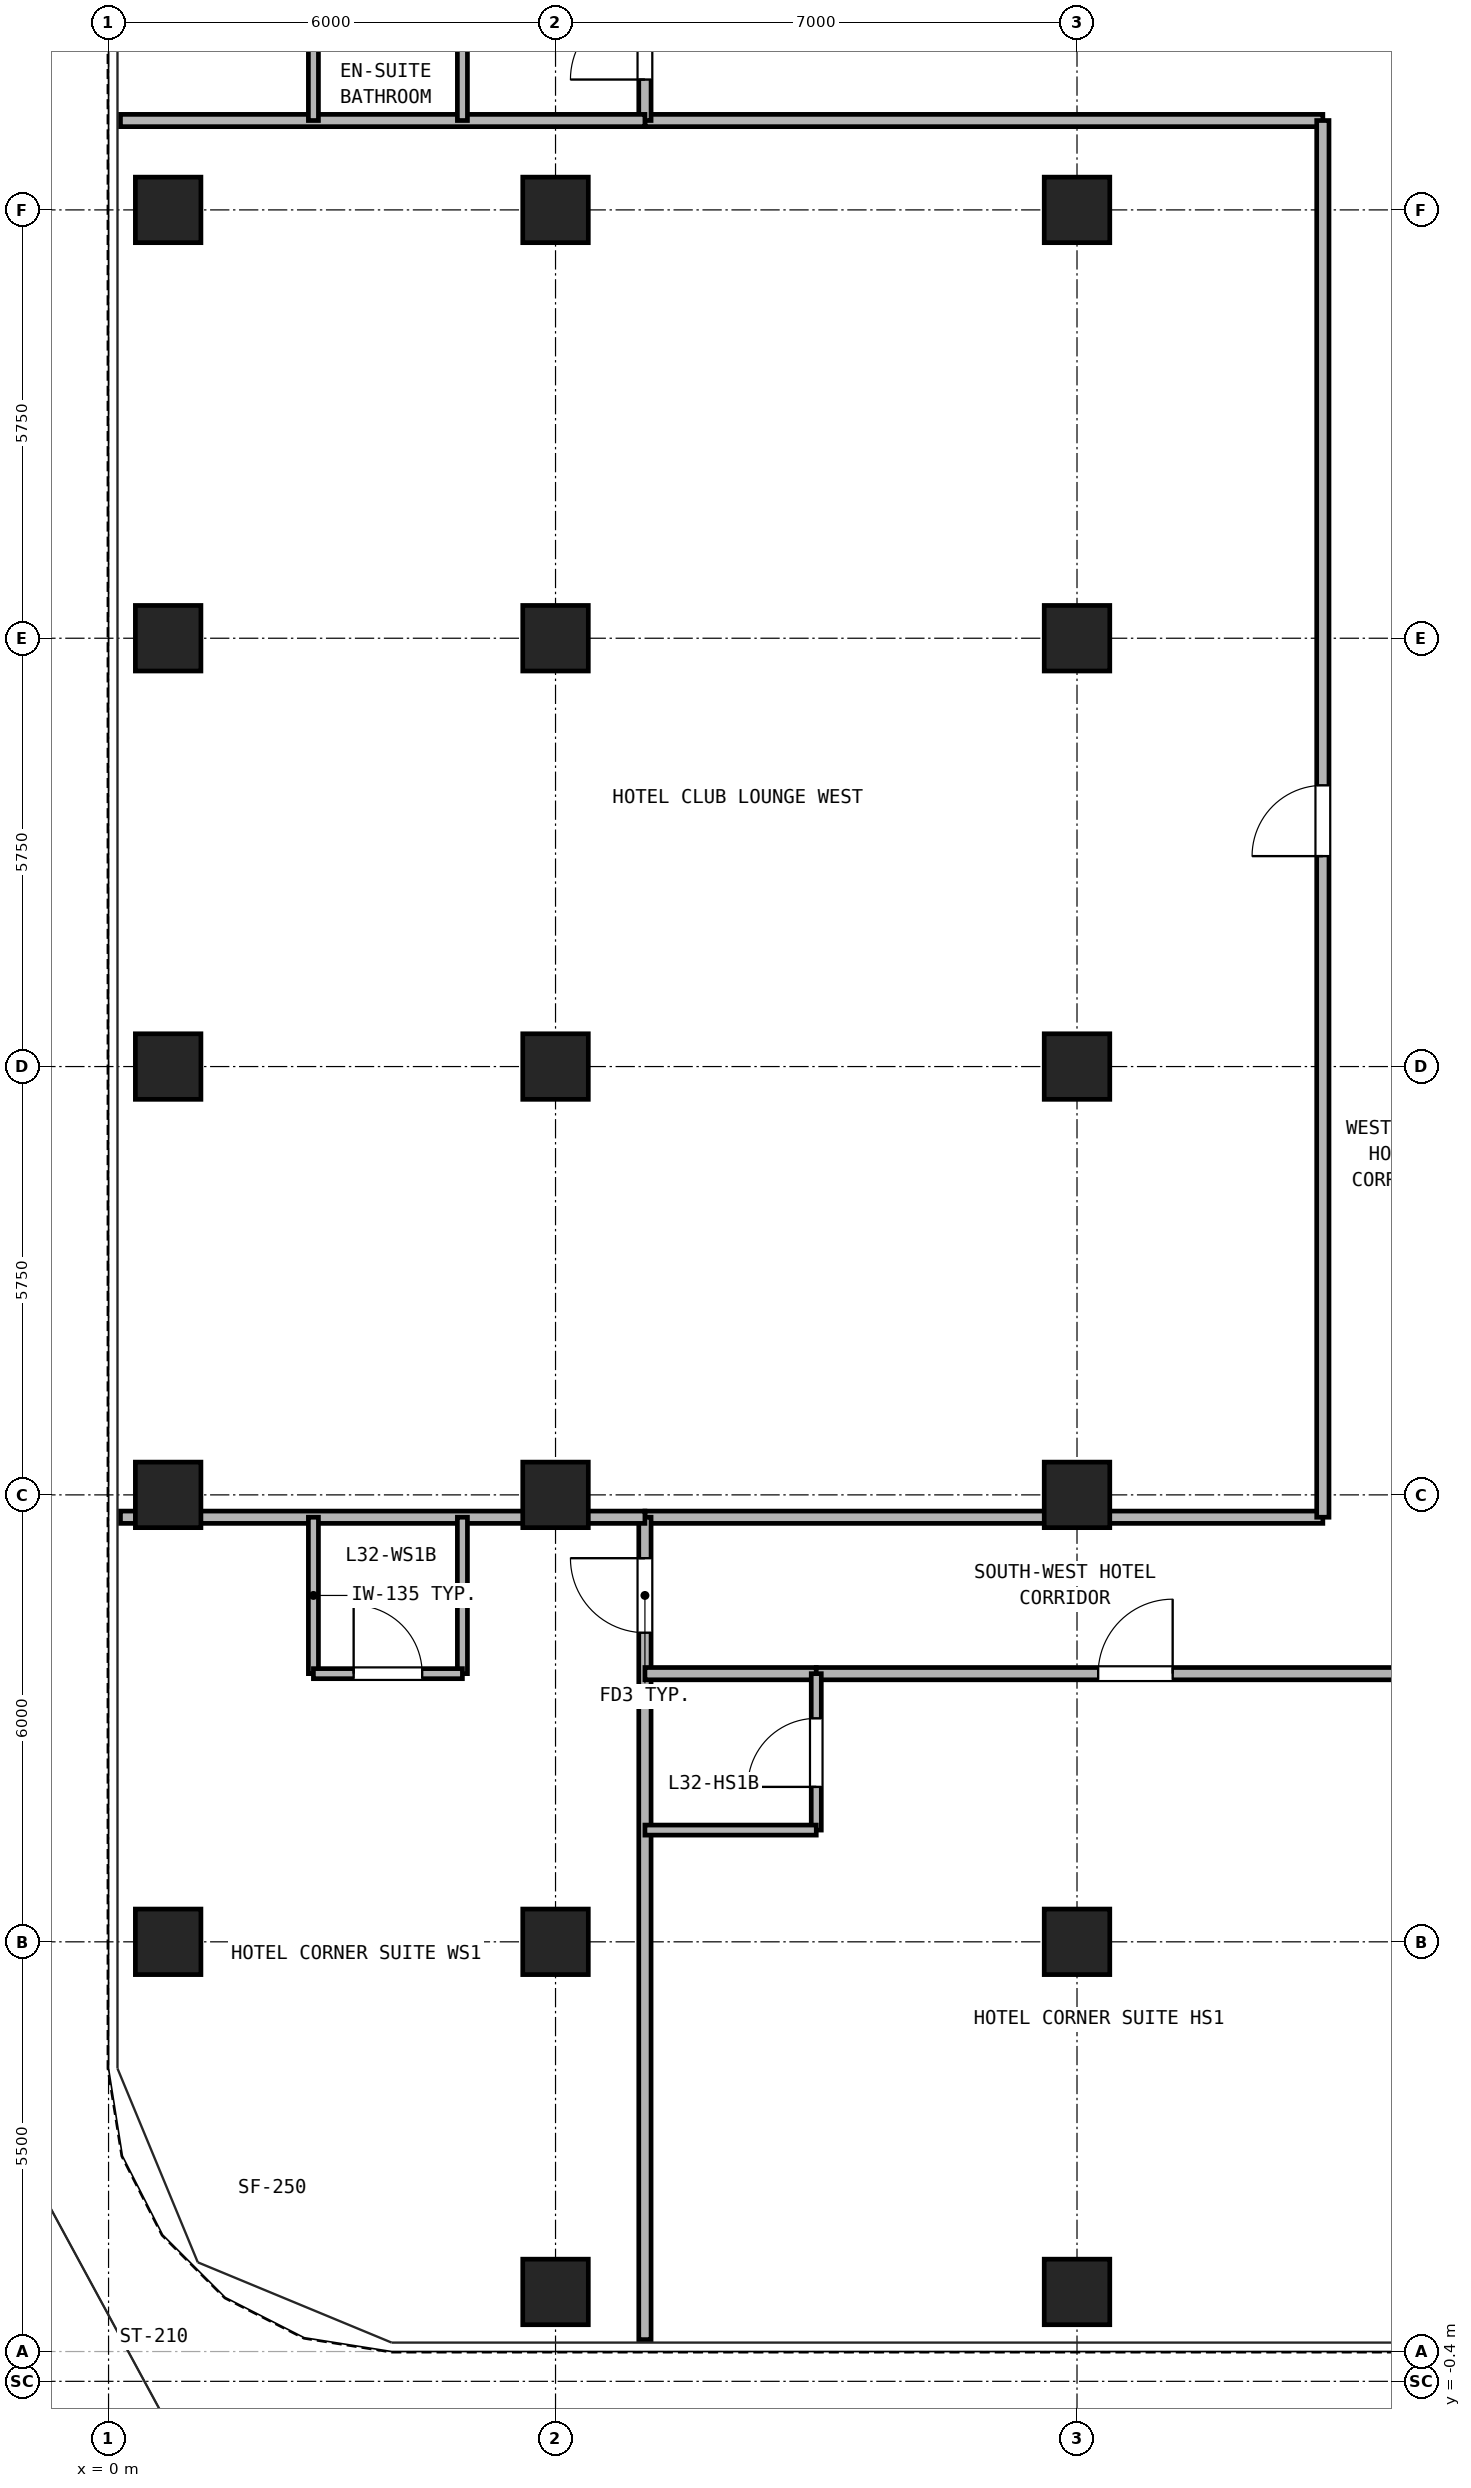
"""IFC4 building model, lengths in metres.
Left out: names, types, materials, properties, quantities, classifications, styles, units other than length and angle.
Written with IfcOpenShell. Run it as: python <this file> out.ifc"""

import sys

from ifc_helpers import new_model, si_unit, direction, frame, frame_2d, origin, origin_2d, place, context, subcontext, project, spatial, rectangle, hollow_rectangle, extrude, source, transform, mapped, element, fill, save


model = new_model("IFC4")
c1 = context("Model", 3, precision=1e-05, world=origin(), true_north=direction((0.0, 1.0)))
c2 = subcontext(c1, "Body", "Model", "MODEL_VIEW")
j1 = project(units=[si_unit("LENGTHUNIT", "METRE"), si_unit("PLANEANGLEUNIT", "RADIAN")], contexts=[c1])
p1 = place(None, origin())
s1 = spatial("IfcSite", under=j1, at=p1, CompositionType="ELEMENT")
p2 = place(p1, origin())
s2 = spatial("IfcBuilding", under=s1, at=p2, CompositionType="ELEMENT")
p3 = place(p2, frame((0.0, 0.0, 118.3)))
s3 = spatial("IfcBuildingStorey", under=s2, at=p3, CompositionType="ELEMENT", Elevation=118.3)
m1 = source(origin(), c2, "Body", "SweptSolid", [
    extrude(hollow_rectangle(XDim=0.88, YDim=0.88, WallThickness=0.05, at=origin_2d()), origin(), (0.0, 0.0, 1.0), 2.95),
])
for number, where, z_axis, x_axis in (
    (1, (6.0, 0.8, 0.0), (0.0, 0.0, 1.0), (1.0, 0.0, 0.0)),
    (2, (13.0, 0.8, 0.0), (0.0, 0.0, 1.0), (1.0, 0.0, 0.0)),
    (3, (0.8, 5.5, 0.0), (0.0, 0.0, 1.0), (1.0, 0.0, 0.0)),
    (4, (0.8, 11.5, 0.0), (0.0, 0.0, 1.0), (1.0, 0.0, 0.0)),
    (5, (0.8, 17.25, 0.0), (0.0, 0.0, 1.0), (1.0, 0.0, 0.0)),
    (6, (0.8, 23.0, 0.0), (0.0, 0.0, 1.0), (1.0, 0.0, 0.0)),
    (7, (0.8, 28.75, 0.0), (0.0, 0.0, 1.0), (1.0, 0.0, 0.0)),
    (8, (6.0, 5.5, 0.0), (0.0, 0.0, 1.0), (1.0, 0.0, 0.0)),
    (9, (6.0, 11.5, 0.0), (0.0, 0.0, 1.0), (1.0, 0.0, 0.0)),
    (10, (6.0, 17.25, 0.0), (0.0, 0.0, 1.0), (1.0, 0.0, 0.0)),
    (11, (6.0, 23.0, 0.0), (0.0, 0.0, 1.0), (1.0, 0.0, 0.0)),
    (12, (6.0, 28.75, 0.0), (0.0, 0.0, 1.0), (1.0, 0.0, 0.0)),
    (13, (13.0, 5.5, 0.0), (0.0, 0.0, 1.0), (1.0, 0.0, 0.0)),
    (14, (13.0, 11.5, 0.0), (0.0, 0.0, 1.0), (1.0, 0.0, 0.0)),
    (15, (13.0, 17.25, 0.0), (0.0, 0.0, 1.0), (1.0, 0.0, 0.0)),
    (16, (13.0, 23.0, 0.0), (0.0, 0.0, 1.0), (1.0, 0.0, 0.0)),
    (17, (13.0, 28.75, 0.0), (0.0, 0.0, 1.0), (1.0, 0.0, 0.0)),
):
    element("IfcColumn", number, at=place(p3, frame(where, z_axis=z_axis, x_axis=x_axis)), inside=s3, PredefinedType="COLUMN", context=c2, shape_type="MappedRepresentation", body=[
        mapped(m1, transform((0.0, 0.0, 0.0), x_axis=(1.0, 0.0, 0.0), y_axis=(0.0, 1.0, 0.0), z_axis=(0.0, 0.0, 1.0), scale=1.0)),
    ])
for number, where, z_axis, x_axis in (
    (18, (7.2, 11.2, 0.0), (0.0, 0.0, 1.0), (1.0, 0.0, 0.0)),
    (19, (7.2, 29.95, 0.0), (0.0, 0.0, 1.0), (1.0, 0.0, 0.0)),
):
    element("IfcWall", number, at=place(p3, frame(where, z_axis=z_axis, x_axis=x_axis)), inside=s3, PredefinedType="PARTITIONING", context=c2, shape_type="SweptSolid", body=[
        extrude(rectangle(XDim=9.1, YDim=0.165, at=frame_2d((4.55, 0.0))), origin(), (0.0, 0.0, 1.0), 2.95),
    ])
p4 = place(p3, frame((16.3, 11.2, 0.0), z_axis=(0.0, 0.0, 1.0), x_axis=(0.0, 1.0, 0.0)))
e20 = element("IfcWall", 20, at=p4, inside=s3, PredefinedType="PARTITIONING", context=c2, shape_type="SweptSolid", body=[
    extrude(rectangle(XDim=18.75, YDim=0.165, at=frame_2d((9.375, 0.0))), origin(), (0.0, 0.0, 1.0), 2.95),
])
p5 = place(p4, frame((8.875, 0.0, 0.0)))
e21 = element("IfcOpeningElement", 21, at=p5, cuts=e20, PredefinedType="OPENING", context=c2, shape_type="SweptSolid", body=[
    extrude(rectangle(XDim=0.95, YDim=2.15, at=frame_2d((0.475, 1.075))), frame((0.0, 0.093, 0.0), z_axis=(0.0, -1.0, 0.0), x_axis=(1.0, 0.0, 0.0)), (0.0, 0.0, 1.0), 0.185),
])
p6 = place(p3, frame((7.2, 0.16, 0.0), z_axis=(0.0, 0.0, 1.0), x_axis=(0.0, 1.0, 0.0)))
e22 = element("IfcWall", 22, at=p6, inside=s3, PredefinedType="PARTITIONING", context=c2, shape_type="SweptSolid", body=[
    extrude(rectangle(XDim=11.04, YDim=0.165, at=frame_2d((5.52, 0.0))), origin(), (0.0, 0.0, 1.0), 2.95),
])
p7 = place(p6, frame((9.49, 0.0, 0.0)))
e23 = element("IfcOpeningElement", 23, at=p7, cuts=e22, PredefinedType="OPENING", context=c2, shape_type="SweptSolid", body=[
    extrude(rectangle(XDim=1.0, YDim=2.15, at=frame_2d((0.5, 1.075))), frame((0.0, 0.093, 0.0), z_axis=(0.0, -1.0, 0.0), x_axis=(1.0, 0.0, 0.0)), (0.0, 0.0, 1.0), 0.185),
])
p8 = place(p3, frame((7.2, 29.95, 0.0), z_axis=(0.0, 0.0, 1.0), x_axis=(0.0, 1.0, 0.0)))
e24 = element("IfcWall", 24, at=p8, inside=s3, PredefinedType="PARTITIONING", context=c2, shape_type="SweptSolid", body=[
    extrude(rectangle(XDim=5.19, YDim=0.165, at=frame_2d((2.595, 0.0))), origin(), (0.0, 0.0, 1.0), 2.95),
])
p9 = place(p8, frame((0.55, 0.0, 0.0)))
e25 = element("IfcOpeningElement", 25, at=p9, cuts=e24, PredefinedType="OPENING", context=c2, shape_type="SweptSolid", body=[
    extrude(rectangle(XDim=1.0, YDim=2.15, at=frame_2d((0.5, 1.075))), frame((0.0, 0.093, 0.0), z_axis=(0.0, -1.0, 0.0), x_axis=(1.0, 0.0, 0.0)), (0.0, 0.0, 1.0), 0.185),
])
for number, where, z_axis, x_axis in (
    (26, (0.16, 11.2, 0.0), (0.0, 0.0, 1.0), (1.0, 0.0, 0.0)),
    (27, (0.16, 29.95, 0.0), (0.0, 0.0, 1.0), (1.0, 0.0, 0.0)),
):
    element("IfcWall", number, at=place(p3, frame(where, z_axis=z_axis, x_axis=x_axis)), inside=s3, PredefinedType="PARTITIONING", context=c2, shape_type="SweptSolid", body=[
        extrude(rectangle(XDim=7.04, YDim=0.165, at=frame_2d((3.52, 0.0))), origin(), (0.0, 0.0, 1.0), 2.95),
    ])
for number, where, z_axis, x_axis in (
    (28, (2.75, 9.1, 0.0), (0.0, 0.0, 1.0), (0.0, 1.0, 0.0)),
    (29, (4.75, 9.1, 0.0), (0.0, 0.0, 1.0), (0.0, 1.0, 0.0)),
):
    element("IfcWall", number, at=place(p3, frame(where, z_axis=z_axis, x_axis=x_axis)), inside=s3, PredefinedType="PARTITIONING", context=c2, shape_type="SweptSolid", body=[
        extrude(rectangle(XDim=2.1, YDim=0.135, at=frame_2d((1.05, 0.0))), origin(), (0.0, 0.0, 1.0), 2.95),
    ])
p10 = place(p3, frame((2.75, 9.1, 0.0), z_axis=(0.0, 0.0, 1.0), x_axis=(1.0, 0.0, 0.0)))
e30 = element("IfcWall", 30, at=p10, inside=s3, PredefinedType="PARTITIONING", context=c2, shape_type="SweptSolid", body=[
    extrude(rectangle(XDim=2.0, YDim=0.135, at=frame_2d((1.0, 0.0))), origin(), (0.0, 0.0, 1.0), 2.95),
])
p11 = place(p10, frame((0.54, 0.0, 0.0)))
e31 = element("IfcOpeningElement", 31, at=p11, cuts=e30, PredefinedType="OPENING", context=c2, shape_type="SweptSolid", body=[
    extrude(rectangle(XDim=0.92, YDim=2.1, at=frame_2d((0.46, 1.05))), frame((0.0, 0.077, 0.0), z_axis=(0.0, -1.0, 0.0), x_axis=(1.0, 0.0, 0.0)), (0.0, 0.0, 1.0), 0.155),
])
for number, where, z_axis, x_axis in (
    (32, (2.75, 29.95, 0.0), (0.0, 0.0, 1.0), (0.0, 1.0, 0.0)),
    (33, (4.75, 29.95, 0.0), (0.0, 0.0, 1.0), (0.0, 1.0, 0.0)),
):
    element("IfcWall", number, at=place(p3, frame(where, z_axis=z_axis, x_axis=x_axis)), inside=s3, PredefinedType="PARTITIONING", context=c2, shape_type="SweptSolid", body=[
        extrude(rectangle(XDim=2.1, YDim=0.135, at=frame_2d((1.05, 0.0))), origin(), (0.0, 0.0, 1.0), 2.95),
    ])
p12 = place(p3, frame((7.2, 9.1, 0.0), z_axis=(0.0, 0.0, 1.0), x_axis=(1.0, 0.0, 0.0)))
e34 = element("IfcWall", 34, at=p12, inside=s3, PredefinedType="PARTITIONING", context=c2, shape_type="SweptSolid", body=[
    extrude(rectangle(XDim=2.3, YDim=0.165, at=frame_2d((1.15, 0.0))), origin(), (0.0, 0.0, 1.0), 2.95),
])
p13 = place(p3, frame((9.5, 9.1, 0.0), z_axis=(0.0, 0.0, 1.0), x_axis=(1.0, 0.0, 0.0)))
e35 = element("IfcWall", 35, at=p13, inside=s3, PredefinedType="PARTITIONING", context=c2, shape_type="SweptSolid", body=[
    extrude(rectangle(XDim=8.567, YDim=0.165, at=frame_2d((4.283, 0.0))), origin(), (0.0, 0.0, 1.0), 2.95),
])
p14 = place(p13, frame((3.784, 0.0, 0.0)))
e36 = element("IfcOpeningElement", 36, at=p14, cuts=e35, PredefinedType="OPENING", context=c2, shape_type="SweptSolid", body=[
    extrude(rectangle(XDim=1.0, YDim=2.15, at=frame_2d((0.5, 1.075))), frame((0.0, 0.093, 0.0), z_axis=(0.0, -1.0, 0.0), x_axis=(1.0, 0.0, 0.0)), (0.0, 0.0, 1.0), 0.185),
])
p15 = place(p3, frame((9.5, 7.0, 0.0), z_axis=(0.0, 0.0, 1.0), x_axis=(0.0, 1.0, 0.0)))
e37 = element("IfcWall", 37, at=p15, inside=s3, PredefinedType="PARTITIONING", context=c2, shape_type="SweptSolid", body=[
    extrude(rectangle(XDim=2.1, YDim=0.135, at=frame_2d((1.05, 0.0))), origin(), (0.0, 0.0, 1.0), 2.95),
])
p16 = place(p15, frame((0.58, 0.0, 0.0)))
e38 = element("IfcOpeningElement", 38, at=p16, cuts=e37, PredefinedType="OPENING", context=c2, shape_type="SweptSolid", body=[
    extrude(rectangle(XDim=0.92, YDim=2.1, at=frame_2d((0.46, 1.05))), frame((0.0, 0.077, 0.0), z_axis=(0.0, -1.0, 0.0), x_axis=(1.0, 0.0, 0.0)), (0.0, 0.0, 1.0), 0.155),
])
p17 = place(p3, frame((7.2, 7.0, 0.0), z_axis=(0.0, 0.0, 1.0), x_axis=(1.0, 0.0, 0.0)))
e39 = element("IfcWall", 39, at=p17, inside=s3, PredefinedType="PARTITIONING", context=c2, shape_type="SweptSolid", body=[
    extrude(rectangle(XDim=2.3, YDim=0.135, at=frame_2d((1.15, 0.0))), origin(), (0.0, 0.0, 1.0), 2.95),
])
p18 = place(p11, origin())
e40 = element("IfcDoor", 40, at=p18, inside=s3, OperationType="SINGLE_SWING_LEFT", PredefinedType="DOOR", context=c2, shape_type="SweptSolid", body=[
    extrude(rectangle(XDim=0.92, YDim=2.1, at=frame_2d((0.46, 1.05))), frame((0.0, 0.025, 0.0), z_axis=(0.0, -1.0, 0.0), x_axis=(1.0, 0.0, 0.0)), (0.0, 0.0, 1.0), 0.05),
])
fill(e31, e40)
p19 = place(p7, origin())
e41 = element("IfcDoor", 41, at=p19, inside=s3, OperationType="SINGLE_SWING_RIGHT", PredefinedType="DOOR", context=c2, shape_type="SweptSolid", body=[
    extrude(rectangle(XDim=1.0, YDim=2.15, at=frame_2d((0.5, 1.075))), frame((0.0, 0.025, 0.0), z_axis=(0.0, -1.0, 0.0), x_axis=(1.0, 0.0, 0.0)), (0.0, 0.0, 1.0), 0.05),
])
fill(e23, e41)
p20 = place(p9, origin())
e42 = element("IfcDoor", 42, at=p20, inside=s3, OperationType="SINGLE_SWING_LEFT", PredefinedType="DOOR", context=c2, shape_type="SweptSolid", body=[
    extrude(rectangle(XDim=1.0, YDim=2.15, at=frame_2d((0.5, 1.075))), frame((0.0, 0.025, 0.0), z_axis=(0.0, -1.0, 0.0), x_axis=(1.0, 0.0, 0.0)), (0.0, 0.0, 1.0), 0.05),
])
fill(e25, e42)
p21 = place(p16, frame((0.92, 0.0, 0.0), z_axis=(0.0, 0.0, 1.0), x_axis=(-1.0, 0.0, 0.0)))
e43 = element("IfcDoor", 43, at=p21, inside=s3, OperationType="SINGLE_SWING_LEFT", PredefinedType="DOOR", context=c2, shape_type="SweptSolid", body=[
    extrude(rectangle(XDim=0.92, YDim=2.1, at=frame_2d((0.46, 1.05))), frame((0.0, 0.025, 0.0), z_axis=(0.0, -1.0, 0.0), x_axis=(1.0, 0.0, 0.0)), (0.0, 0.0, 1.0), 0.05),
])
fill(e38, e43)
p22 = place(p14, frame((1.0, 0.0, 0.0), z_axis=(0.0, 0.0, 1.0), x_axis=(-1.0, 0.0, 0.0)))
e44 = element("IfcDoor", 44, at=p22, inside=s3, OperationType="SINGLE_SWING_RIGHT", PredefinedType="DOOR", context=c2, shape_type="SweptSolid", body=[
    extrude(rectangle(XDim=1.0, YDim=2.15, at=frame_2d((0.5, 1.075))), frame((0.0, 0.025, 0.0), z_axis=(0.0, -1.0, 0.0), x_axis=(1.0, 0.0, 0.0)), (0.0, 0.0, 1.0), 0.05),
])
fill(e36, e44)
p23 = place(p5, frame((0.95, 0.0, 0.0), z_axis=(0.0, 0.0, 1.0), x_axis=(-1.0, 0.0, 0.0)))
e45 = element("IfcDoor", 45, at=p23, inside=s3, OperationType="SINGLE_SWING_LEFT", PredefinedType="DOOR", context=c2, shape_type="SweptSolid", body=[
    extrude(rectangle(XDim=0.95, YDim=2.15, at=frame_2d((0.475, 1.075))), frame((0.0, 0.025, 0.0), z_axis=(0.0, -1.0, 0.0), x_axis=(1.0, 0.0, 0.0)), (0.0, 0.0, 1.0), 0.05),
])
fill(e21, e45)
save(model, sys.argv[1])
